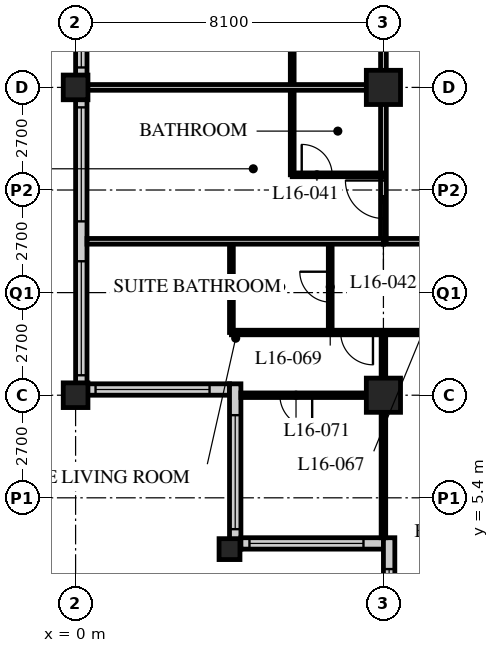
"""IFC4 building model, lengths in metres.
Left out: names, types, materials, properties, quantities, classifications, styles, units other than length and angle.
Written with IfcOpenShell. Run it as: python <this file> out.ifc"""

import sys

from ifc_helpers import new_model, si_unit, direction, frame, frame_2d, origin, origin_2d, place, context, subcontext, project, spatial, rectangle, hollow_rectangle, extrude, element, fill, save


model = new_model("IFC4")
c1 = context("Model", 3, precision=1e-05, world=origin(), true_north=direction((0.0, 1.0)))
c2 = subcontext(c1, "Body", "Model", "MODEL_VIEW")
j1 = project(units=[si_unit("LENGTHUNIT", "METRE"), si_unit("PLANEANGLEUNIT", "RADIAN")], contexts=[c1])
p1 = place(None, origin())
s1 = spatial("IfcSite", under=j1, at=p1, CompositionType="ELEMENT")
p2 = place(p1, origin())
s2 = spatial("IfcBuilding", under=s1, at=p2, CompositionType="ELEMENT")
p3 = place(p2, frame((0.0, 0.0, 67.0)))
s3 = spatial("IfcBuildingStorey", under=s2, at=p3, CompositionType="ELEMENT", Elevation=67.0)
for number, where, z_axis, x_axis in (
    (1, (0.0, 8.1, 0.0), (0.0, 0.0, 1.0), (1.0, 0.0, 0.0)),
    (2, (0.0, 16.2, 0.0), (0.0, 0.0, 1.0), (1.0, 0.0, 0.0)),
):
    element("IfcColumn", number, at=place(p3, frame(where, z_axis=z_axis, x_axis=x_axis)), inside=s3, PredefinedType="COLUMN", context=c2, shape_type="SweptSolid", body=[
        extrude(hollow_rectangle(XDim=0.65, YDim=0.65, WallThickness=0.05, at=origin_2d()), origin(), (0.0, 0.0, 1.0), 3.4),
    ])
p4 = place(p3, frame((4.05, 4.05, 0.0), z_axis=(0.0, 0.0, 1.0), x_axis=(1.0, 0.0, 0.0)))
e3 = element("IfcColumn", 3, at=p4, inside=s3, PredefinedType="COLUMN", context=c2, shape_type="SweptSolid", body=[
    extrude(hollow_rectangle(XDim=0.55, YDim=0.55, WallThickness=0.05, at=origin_2d()), origin(), (0.0, 0.0, 1.0), 3.4),
])
for number, where, z_axis, x_axis in (
    (4, (8.1, 8.1, 0.0), (0.0, 0.0, 1.0), (1.0, 0.0, 0.0)),
    (5, (8.1, 16.2, 0.0), (0.0, 0.0, 1.0), (1.0, 0.0, 0.0)),
):
    element("IfcColumn", number, at=place(p3, frame(where, z_axis=z_axis, x_axis=x_axis)), inside=s3, PredefinedType="COLUMN", context=c2, shape_type="SweptSolid", body=[
        extrude(hollow_rectangle(XDim=0.9, YDim=0.9, WallThickness=0.09, at=origin_2d()), origin(), (0.0, 0.0, 1.0), 3.4),
    ])
p5 = place(p3, frame((0.15, 40.2, 0.0), z_axis=(0.0, 0.0, 1.0), x_axis=(0.0, -1.0, 0.0)))
e6 = element("IfcWall", 6, at=p5, inside=s3, PredefinedType="SOLIDWALL", context=c2, shape_type="SweptSolid", body=[
    extrude(rectangle(XDim=32.1, YDim=0.3, at=frame_2d((16.05, 0.0))), origin(), (0.0, 0.0, 1.0), 3.19),
])
p6 = place(p5, frame((0.225, 0.0, 0.9)))
e7 = element("IfcOpeningElement", 7, at=p6, cuts=e6, PredefinedType="OPENING", context=c2, shape_type="SweptSolid", body=[
    extrude(rectangle(XDim=3.0, YDim=2.0, at=frame_2d((1.5, 1.0))), frame((0.0, 0.16, 0.0), z_axis=(0.0, -1.0, 0.0), x_axis=(1.0, 0.0, 0.0)), (0.0, 0.0, 1.0), 0.32),
])
p7 = place(p5, frame((4.275, 0.0, 0.9)))
e8 = element("IfcOpeningElement", 8, at=p7, cuts=e6, PredefinedType="OPENING", context=c2, shape_type="SweptSolid", body=[
    extrude(rectangle(XDim=3.0, YDim=2.0, at=frame_2d((1.5, 1.0))), frame((0.0, 0.16, 0.0), z_axis=(0.0, -1.0, 0.0), x_axis=(1.0, 0.0, 0.0)), (0.0, 0.0, 1.0), 0.32),
])
p8 = place(p5, frame((8.325, 0.0, 0.9)))
e9 = element("IfcOpeningElement", 9, at=p8, cuts=e6, PredefinedType="OPENING", context=c2, shape_type="SweptSolid", body=[
    extrude(rectangle(XDim=3.0, YDim=2.0, at=frame_2d((1.5, 1.0))), frame((0.0, 0.16, 0.0), z_axis=(0.0, -1.0, 0.0), x_axis=(1.0, 0.0, 0.0)), (0.0, 0.0, 1.0), 0.32),
])
p9 = place(p5, frame((12.375, 0.0, 0.9)))
e10 = element("IfcOpeningElement", 10, at=p9, cuts=e6, PredefinedType="OPENING", context=c2, shape_type="SweptSolid", body=[
    extrude(rectangle(XDim=3.0, YDim=2.0, at=frame_2d((1.5, 1.0))), frame((0.0, 0.16, 0.0), z_axis=(0.0, -1.0, 0.0), x_axis=(1.0, 0.0, 0.0)), (0.0, 0.0, 1.0), 0.32),
])
p10 = place(p5, frame((16.425, 0.0, 0.9)))
e11 = element("IfcOpeningElement", 11, at=p10, cuts=e6, PredefinedType="OPENING", context=c2, shape_type="SweptSolid", body=[
    extrude(rectangle(XDim=3.0, YDim=2.0, at=frame_2d((1.5, 1.0))), frame((0.0, 0.16, 0.0), z_axis=(0.0, -1.0, 0.0), x_axis=(1.0, 0.0, 0.0)), (0.0, 0.0, 1.0), 0.32),
])
p11 = place(p5, frame((20.475, 0.0, 0.9)))
e12 = element("IfcOpeningElement", 12, at=p11, cuts=e6, PredefinedType="OPENING", context=c2, shape_type="SweptSolid", body=[
    extrude(rectangle(XDim=3.0, YDim=2.0, at=frame_2d((1.5, 1.0))), frame((0.0, 0.16, 0.0), z_axis=(0.0, -1.0, 0.0), x_axis=(1.0, 0.0, 0.0)), (0.0, 0.0, 1.0), 0.32),
])
p12 = place(p5, frame((24.525, 0.0, 0.9)))
e13 = element("IfcOpeningElement", 13, at=p12, cuts=e6, PredefinedType="OPENING", context=c2, shape_type="SweptSolid", body=[
    extrude(rectangle(XDim=3.0, YDim=2.0, at=frame_2d((1.5, 1.0))), frame((0.0, 0.16, 0.0), z_axis=(0.0, -1.0, 0.0), x_axis=(1.0, 0.0, 0.0)), (0.0, 0.0, 1.0), 0.32),
])
p13 = place(p5, frame((28.575, 0.0, 0.9)))
e14 = element("IfcOpeningElement", 14, at=p13, cuts=e6, PredefinedType="OPENING", context=c2, shape_type="SweptSolid", body=[
    extrude(rectangle(XDim=3.0, YDim=2.0, at=frame_2d((1.5, 1.0))), frame((0.0, 0.16, 0.0), z_axis=(0.0, -1.0, 0.0), x_axis=(1.0, 0.0, 0.0)), (0.0, 0.0, 1.0), 0.32),
])
p14 = place(p3, frame((0.3, 8.25, 0.0), z_axis=(0.0, 0.0, 1.0), x_axis=(1.0, 0.0, 0.0)))
e15 = element("IfcWall", 15, at=p14, inside=s3, PredefinedType="SOLIDWALL", context=c2, shape_type="SweptSolid", body=[
    extrude(rectangle(XDim=3.75, YDim=0.3, at=frame_2d((1.875, 0.0))), origin(), (0.0, 0.0, 1.0), 3.19),
])
p15 = place(p14, frame((0.225, 0.0, 0.9)))
e16 = element("IfcOpeningElement", 16, at=p15, cuts=e15, PredefinedType="OPENING", context=c2, shape_type="SweptSolid", body=[
    extrude(rectangle(XDim=3.0, YDim=1.5, at=frame_2d((1.5, 0.75))), frame((0.0, 0.16, 0.0), z_axis=(0.0, -1.0, 0.0), x_axis=(1.0, 0.0, 0.0)), (0.0, 0.0, 1.0), 0.32),
])
p16 = place(p3, frame((4.2, 8.4, 0.0), z_axis=(0.0, 0.0, 1.0), x_axis=(0.0, -1.0, 0.0)))
e17 = element("IfcWall", 17, at=p16, inside=s3, PredefinedType="SOLIDWALL", context=c2, shape_type="SweptSolid", body=[
    extrude(rectangle(XDim=4.35, YDim=0.3, at=frame_2d((2.175, 0.0))), origin(), (0.0, 0.0, 1.0), 3.19),
])
p17 = place(p16, frame((0.825, 0.0, 0.9)))
e18 = element("IfcOpeningElement", 18, at=p17, cuts=e17, PredefinedType="OPENING", context=c2, shape_type="SweptSolid", body=[
    extrude(rectangle(XDim=3.0, YDim=1.5, at=frame_2d((1.5, 0.75))), frame((0.0, 0.16, 0.0), z_axis=(0.0, -1.0, 0.0), x_axis=(1.0, 0.0, 0.0)), (0.0, 0.0, 1.0), 0.32),
])
p18 = place(p3, frame((4.35, 4.2, 0.0), z_axis=(0.0, 0.0, 1.0), x_axis=(1.0, 0.0, 0.0)))
e19 = element("IfcWall", 19, at=p18, inside=s3, PredefinedType="SOLIDWALL", context=c2, shape_type="SweptSolid", body=[
    extrude(rectangle(XDim=3.75, YDim=0.3, at=frame_2d((1.875, 0.0))), origin(), (0.0, 0.0, 1.0), 3.19),
])
p19 = place(p18, frame((0.225, 0.0, 0.9)))
e20 = element("IfcOpeningElement", 20, at=p19, cuts=e19, PredefinedType="OPENING", context=c2, shape_type="SweptSolid", body=[
    extrude(rectangle(XDim=3.0, YDim=1.5, at=frame_2d((1.5, 0.75))), frame((0.0, 0.16, 0.0), z_axis=(0.0, -1.0, 0.0), x_axis=(1.0, 0.0, 0.0)), (0.0, 0.0, 1.0), 0.32),
])
p20 = place(p3, frame((8.25, 4.35, 0.0), z_axis=(0.0, 0.0, 1.0), x_axis=(0.0, -1.0, 0.0)))
e21 = element("IfcWall", 21, at=p20, inside=s3, PredefinedType="SOLIDWALL", context=c2, shape_type="SweptSolid", body=[
    extrude(rectangle(XDim=4.35, YDim=0.3, at=frame_2d((2.175, 0.0))), origin(), (0.0, 0.0, 1.0), 3.19),
])
p21 = place(p20, frame((0.825, 0.0, 0.9)))
e22 = element("IfcOpeningElement", 22, at=p21, cuts=e21, PredefinedType="OPENING", context=c2, shape_type="SweptSolid", body=[
    extrude(rectangle(XDim=3.0, YDim=1.5, at=frame_2d((1.5, 0.75))), frame((0.0, 0.16, 0.0), z_axis=(0.0, -1.0, 0.0), x_axis=(1.0, 0.0, 0.0)), (0.0, 0.0, 1.0), 0.32),
])
p22 = place(p3, frame((8.1, 12.15, 0.0), z_axis=(0.0, 0.0, 1.0), x_axis=(1.0, 0.0, 0.0)))
e23 = element("IfcWall", 23, at=p22, inside=s3, PredefinedType="PARTITIONING", context=c2, shape_type="SweptSolid", body=[
    extrude(rectangle(XDim=36.45, YDim=0.15, at=frame_2d((18.225, 0.0))), origin(), (0.0, 0.0, 1.0), 3.19),
])
p23 = place(p22, frame((4.35, 0.0, 0.0)))
e24 = element("IfcOpeningElement", 24, at=p23, cuts=e23, PredefinedType="OPENING", context=c2, shape_type="SweptSolid", body=[
    extrude(rectangle(XDim=1.0, YDim=2.1, at=frame_2d((0.5, 1.05))), frame((0.0, 0.085, 0.0), z_axis=(0.0, -1.0, 0.0), x_axis=(1.0, 0.0, 0.0)), (0.0, 0.0, 1.0), 0.17),
])
p24 = place(p22, frame((10.55, 0.0, 0.0)))
e25 = element("IfcOpeningElement", 25, at=p24, cuts=e23, PredefinedType="OPENING", context=c2, shape_type="SweptSolid", body=[
    extrude(rectangle(XDim=1.0, YDim=2.1, at=frame_2d((0.5, 1.05))), frame((0.0, 0.085, 0.0), z_axis=(0.0, -1.0, 0.0), x_axis=(1.0, 0.0, 0.0)), (0.0, 0.0, 1.0), 0.17),
])
p25 = place(p22, frame((14.6, 0.0, 0.0)))
e26 = element("IfcOpeningElement", 26, at=p25, cuts=e23, PredefinedType="OPENING", context=c2, shape_type="SweptSolid", body=[
    extrude(rectangle(XDim=1.0, YDim=2.1, at=frame_2d((0.5, 1.05))), frame((0.0, 0.085, 0.0), z_axis=(0.0, -1.0, 0.0), x_axis=(1.0, 0.0, 0.0)), (0.0, 0.0, 1.0), 0.17),
])
p26 = place(p22, frame((18.65, 0.0, 0.0)))
e27 = element("IfcOpeningElement", 27, at=p26, cuts=e23, PredefinedType="OPENING", context=c2, shape_type="SweptSolid", body=[
    extrude(rectangle(XDim=1.0, YDim=2.1, at=frame_2d((0.5, 1.05))), frame((0.0, 0.085, 0.0), z_axis=(0.0, -1.0, 0.0), x_axis=(1.0, 0.0, 0.0)), (0.0, 0.0, 1.0), 0.17),
])
p27 = place(p22, frame((22.7, 0.0, 0.0)))
e28 = element("IfcOpeningElement", 28, at=p27, cuts=e23, PredefinedType="OPENING", context=c2, shape_type="SweptSolid", body=[
    extrude(rectangle(XDim=1.0, YDim=2.1, at=frame_2d((0.5, 1.05))), frame((0.0, 0.085, 0.0), z_axis=(0.0, -1.0, 0.0), x_axis=(1.0, 0.0, 0.0)), (0.0, 0.0, 1.0), 0.17),
])
p28 = place(p22, frame((24.6, 0.0, 0.0)))
e29 = element("IfcOpeningElement", 29, at=p28, cuts=e23, PredefinedType="OPENING", context=c2, shape_type="SweptSolid", body=[
    extrude(rectangle(XDim=1.0, YDim=2.1, at=frame_2d((0.5, 1.05))), frame((0.0, 0.085, 0.0), z_axis=(0.0, -1.0, 0.0), x_axis=(1.0, 0.0, 0.0)), (0.0, 0.0, 1.0), 0.17),
])
p29 = place(p22, frame((30.8, 0.0, 0.0)))
e30 = element("IfcOpeningElement", 30, at=p29, cuts=e23, PredefinedType="OPENING", context=c2, shape_type="SweptSolid", body=[
    extrude(rectangle(XDim=1.0, YDim=2.1, at=frame_2d((0.5, 1.05))), frame((0.0, 0.085, 0.0), z_axis=(0.0, -1.0, 0.0), x_axis=(1.0, 0.0, 0.0)), (0.0, 0.0, 1.0), 0.17),
])
p30 = place(p22, frame((1.525, 0.0, 0.0)))
e31 = element("IfcOpeningElement", 31, at=p30, cuts=e23, PredefinedType="OPENING", context=c2, shape_type="SweptSolid", body=[
    extrude(rectangle(XDim=1.0, YDim=2.1, at=frame_2d((0.5, 1.05))), frame((0.0, 0.085, 0.0), z_axis=(0.0, -1.0, 0.0), x_axis=(1.0, 0.0, 0.0)), (0.0, 0.0, 1.0), 0.17),
])
p31 = place(p22, frame((33.925, 0.0, 0.0)))
e32 = element("IfcOpeningElement", 32, at=p31, cuts=e23, PredefinedType="OPENING", context=c2, shape_type="SweptSolid", body=[
    extrude(rectangle(XDim=1.0, YDim=2.1, at=frame_2d((0.5, 1.05))), frame((0.0, 0.085, 0.0), z_axis=(0.0, -1.0, 0.0), x_axis=(1.0, 0.0, 0.0)), (0.0, 0.0, 1.0), 0.17),
])
p32 = place(p3, frame((8.1, 12.15, 0.0), z_axis=(0.0, 0.0, 1.0), x_axis=(0.0, 1.0, 0.0)))
e33 = element("IfcWall", 33, at=p32, inside=s3, PredefinedType="PARTITIONING", context=c2, shape_type="SweptSolid", body=[
    extrude(rectangle(XDim=30.15, YDim=0.15, at=frame_2d((15.075, 0.0))), origin(), (0.0, 0.0, 1.0), 2.578),
])
p33 = place(p32, frame((0.6, 0.0, 0.0)))
e34 = element("IfcOpeningElement", 34, at=p33, cuts=e33, PredefinedType="OPENING", context=c2, shape_type="SweptSolid", body=[
    extrude(rectangle(XDim=1.0, YDim=2.1, at=frame_2d((0.5, 1.05))), frame((0.0, 0.085, 0.0), z_axis=(0.0, -1.0, 0.0), x_axis=(1.0, 0.0, 0.0)), (0.0, 0.0, 1.0), 0.17),
])
p34 = place(p32, frame((6.8, 0.0, 0.0)))
e35 = element("IfcOpeningElement", 35, at=p34, cuts=e33, PredefinedType="OPENING", context=c2, shape_type="SweptSolid", body=[
    extrude(rectangle(XDim=1.0, YDim=2.1, at=frame_2d((0.5, 1.05))), frame((0.0, 0.085, 0.0), z_axis=(0.0, -1.0, 0.0), x_axis=(1.0, 0.0, 0.0)), (0.0, 0.0, 1.0), 0.17),
])
p35 = place(p32, frame((8.7, 0.0, 0.0)))
e36 = element("IfcOpeningElement", 36, at=p35, cuts=e33, PredefinedType="OPENING", context=c2, shape_type="SweptSolid", body=[
    extrude(rectangle(XDim=1.0, YDim=2.1, at=frame_2d((0.5, 1.05))), frame((0.0, 0.085, 0.0), z_axis=(0.0, -1.0, 0.0), x_axis=(1.0, 0.0, 0.0)), (0.0, 0.0, 1.0), 0.17),
])
p36 = place(p32, frame((14.6, 0.0, 0.0)))
e37 = element("IfcOpeningElement", 37, at=p36, cuts=e33, PredefinedType="OPENING", context=c2, shape_type="SweptSolid", body=[
    extrude(rectangle(XDim=1.0, YDim=2.1, at=frame_2d((0.5, 1.05))), frame((0.0, 0.085, 0.0), z_axis=(0.0, -1.0, 0.0), x_axis=(1.0, 0.0, 0.0)), (0.0, 0.0, 1.0), 0.17),
])
p37 = place(p32, frame((21.65, 0.0, 0.0)))
e38 = element("IfcOpeningElement", 38, at=p37, cuts=e33, PredefinedType="OPENING", context=c2, shape_type="SweptSolid", body=[
    extrude(rectangle(XDim=1.0, YDim=2.1, at=frame_2d((0.5, 1.05))), frame((0.0, 0.085, 0.0), z_axis=(0.0, -1.0, 0.0), x_axis=(1.0, 0.0, 0.0)), (0.0, 0.0, 1.0), 0.17),
])
p38 = place(p32, frame((26.75, 0.0, 0.0)))
e39 = element("IfcOpeningElement", 39, at=p38, cuts=e33, PredefinedType="OPENING", context=c2, shape_type="SweptSolid", body=[
    extrude(rectangle(XDim=1.0, YDim=2.1, at=frame_2d((0.5, 1.05))), frame((0.0, 0.085, 0.0), z_axis=(0.0, -1.0, 0.0), x_axis=(1.0, 0.0, 0.0)), (0.0, 0.0, 1.0), 0.17),
])
p39 = place(p3, frame((5.7, 13.9, 0.0), z_axis=(0.0, 0.0, 1.0), x_axis=(0.0, 1.0, 0.0)))
e40 = element("IfcWall", 40, at=p39, inside=s3, PredefinedType="PARTITIONING", context=c2, shape_type="SweptSolid", body=[
    extrude(rectangle(XDim=4.9, YDim=0.1, at=frame_2d((2.45, 0.0))), origin(), (0.0, 0.0, 1.0), 3.19),
])
p40 = place(p3, frame((8.1, 13.9, 0.0), z_axis=(0.0, 0.0, 1.0), x_axis=(-1.0, 0.0, 0.0)))
e41 = element("IfcWall", 41, at=p40, inside=s3, PredefinedType="PARTITIONING", context=c2, shape_type="SweptSolid", body=[
    extrude(rectangle(XDim=2.4, YDim=0.1, at=frame_2d((1.2, 0.0))), origin(), (0.0, 0.0, 1.0), 3.19),
])
p41 = place(p40, frame((1.35, 0.0, 0.0)))
e42 = element("IfcOpeningElement", 42, at=p41, cuts=e41, PredefinedType="OPENING", context=c2, shape_type="SweptSolid", body=[
    extrude(rectangle(XDim=0.8, YDim=2.1, at=frame_2d((0.4, 1.05))), frame((0.0, 0.06, 0.0), z_axis=(0.0, -1.0, 0.0), x_axis=(1.0, 0.0, 0.0)), (0.0, 0.0, 1.0), 0.12),
])
p42 = place(p3, frame((8.1, 16.2, 0.0), z_axis=(0.0, 0.0, 1.0), x_axis=(-1.0, 0.0, 0.0)))
e43 = element("IfcWall", 43, at=p42, inside=s3, PredefinedType="PARTITIONING", context=c2, shape_type="SweptSolid", body=[
    extrude(rectangle(XDim=7.8, YDim=0.15, at=frame_2d((3.9, 0.0))), origin(), (0.0, 0.0, 1.0), 2.578),
])
p43 = place(p3, frame((6.7, 12.15, 0.0), z_axis=(0.0, 0.0, 1.0), x_axis=(0.0, -1.0, 0.0)))
e44 = element("IfcWall", 44, at=p43, inside=s3, PredefinedType="PARTITIONING", context=c2, shape_type="SweptSolid", body=[
    extrude(rectangle(XDim=2.4, YDim=0.1, at=frame_2d((1.2, 0.0))), origin(), (0.0, 0.0, 1.0), 3.19),
])
p44 = place(p43, frame((0.8, 0.0, 0.0)))
e45 = element("IfcOpeningElement", 45, at=p44, cuts=e44, PredefinedType="OPENING", context=c2, shape_type="SweptSolid", body=[
    extrude(rectangle(XDim=0.8, YDim=2.1, at=frame_2d((0.4, 1.05))), frame((0.0, 0.06, 0.0), z_axis=(0.0, -1.0, 0.0), x_axis=(1.0, 0.0, 0.0)), (0.0, 0.0, 1.0), 0.12),
])
p45 = place(p3, frame((4.1, 12.15, 0.0), z_axis=(0.0, 0.0, 1.0), x_axis=(0.0, -1.0, 0.0)))
e46 = element("IfcWall", 46, at=p45, inside=s3, PredefinedType="PARTITIONING", context=c2, shape_type="SweptSolid", body=[
    extrude(rectangle(XDim=2.4, YDim=0.1, at=frame_2d((1.2, 0.0))), origin(), (0.0, 0.0, 1.0), 3.19),
])
p46 = place(p3, frame((4.1, 9.75, 0.0), z_axis=(0.0, 0.0, 1.0), x_axis=(1.0, 0.0, 0.0)))
e47 = element("IfcWall", 47, at=p46, inside=s3, PredefinedType="PARTITIONING", context=c2, shape_type="SweptSolid", body=[
    extrude(rectangle(XDim=8.05, YDim=0.12, at=frame_2d((4.025, 0.0))), origin(), (0.0, 0.0, 1.0), 3.19),
])
p47 = place(p46, frame((6.725, 0.0, 0.0)))
e48 = element("IfcOpeningElement", 48, at=p47, cuts=e47, PredefinedType="OPENING", context=c2, shape_type="SweptSolid", body=[
    extrude(rectangle(XDim=0.85, YDim=2.1, at=frame_2d((0.425, 1.05))), frame((0.0, 0.07, 0.0), z_axis=(0.0, -1.0, 0.0), x_axis=(1.0, 0.0, 0.0)), (0.0, 0.0, 1.0), 0.14),
])
p48 = place(p46, frame((2.875, 0.0, 0.0)))
e49 = element("IfcOpeningElement", 49, at=p48, cuts=e47, PredefinedType="OPENING", context=c2, shape_type="SweptSolid", body=[
    extrude(rectangle(XDim=0.85, YDim=2.1, at=frame_2d((0.425, 1.05))), frame((0.0, 0.07, 0.0), z_axis=(0.0, -1.0, 0.0), x_axis=(1.0, 0.0, 0.0)), (0.0, 0.0, 1.0), 0.14),
])
p49 = place(p3, frame((8.1, 9.75, 0.0), z_axis=(0.0, 0.0, 1.0), x_axis=(0.0, -1.0, 0.0)))
e50 = element("IfcWall", 50, at=p49, inside=s3, PredefinedType="PARTITIONING", context=c2, shape_type="SweptSolid", body=[
    extrude(rectangle(XDim=5.4, YDim=0.12, at=frame_2d((2.7, 0.0))), origin(), (0.0, 0.0, 1.0), 2.578),
])
p50 = place(p3, frame((8.1, 8.1, 0.0), z_axis=(0.0, 0.0, 1.0), x_axis=(-1.0, 0.0, 0.0)))
e51 = element("IfcWall", 51, at=p50, inside=s3, PredefinedType="PARTITIONING", context=c2, shape_type="SweptSolid", body=[
    extrude(rectangle(XDim=3.75, YDim=0.12, at=frame_2d((1.875, 0.0))), origin(), (0.0, 0.0, 1.0), 2.578),
])
p51 = place(p50, frame((1.875, 0.0, 0.0)))
e52 = element("IfcOpeningElement", 52, at=p51, cuts=e51, PredefinedType="OPENING", context=c2, shape_type="SweptSolid", body=[
    extrude(rectangle(XDim=0.85, YDim=2.1, at=frame_2d((0.425, 1.05))), frame((0.0, 0.07, 0.0), z_axis=(0.0, -1.0, 0.0), x_axis=(1.0, 0.0, 0.0)), (0.0, 0.0, 1.0), 0.14),
])
p52 = place(p3, frame((0.3, 12.15, 0.0), z_axis=(0.0, 0.0, 1.0), x_axis=(1.0, 0.0, 0.0)))
e53 = element("IfcWall", 53, at=p52, inside=s3, PredefinedType="PARTITIONING", context=c2, shape_type="SweptSolid", body=[
    extrude(rectangle(XDim=7.8, YDim=0.15, at=frame_2d((3.9, 0.0))), origin(), (0.0, 0.0, 1.0), 3.19),
])
p53 = place(p11, origin())
e54 = element("IfcWindow", 54, at=p53, inside=s3, PartitioningType="SINGLE_PANEL", PredefinedType="WINDOW", context=c2, shape_type="SweptSolid", body=[
    extrude(rectangle(XDim=3.0, YDim=2.0, at=frame_2d((1.5, 1.0))), frame((0.0, 0.03, 0.0), z_axis=(0.0, -1.0, 0.0), x_axis=(1.0, 0.0, 0.0)), (0.0, 0.0, 1.0), 0.06),
])
fill(e12, e54)
p54 = place(p12, origin())
e55 = element("IfcWindow", 55, at=p54, inside=s3, PartitioningType="SINGLE_PANEL", PredefinedType="WINDOW", context=c2, shape_type="SweptSolid", body=[
    extrude(rectangle(XDim=3.0, YDim=2.0, at=frame_2d((1.5, 1.0))), frame((0.0, 0.03, 0.0), z_axis=(0.0, -1.0, 0.0), x_axis=(1.0, 0.0, 0.0)), (0.0, 0.0, 1.0), 0.06),
])
fill(e13, e55)
p55 = place(p13, origin())
e56 = element("IfcWindow", 56, at=p55, inside=s3, PartitioningType="SINGLE_PANEL", PredefinedType="WINDOW", context=c2, shape_type="SweptSolid", body=[
    extrude(rectangle(XDim=3.0, YDim=2.0, at=frame_2d((1.5, 1.0))), frame((0.0, 0.03, 0.0), z_axis=(0.0, -1.0, 0.0), x_axis=(1.0, 0.0, 0.0)), (0.0, 0.0, 1.0), 0.06),
])
fill(e14, e56)
p56 = place(p15, origin())
e57 = element("IfcWindow", 57, at=p56, inside=s3, PartitioningType="SINGLE_PANEL", PredefinedType="WINDOW", context=c2, shape_type="SweptSolid", body=[
    extrude(rectangle(XDim=3.0, YDim=1.5, at=frame_2d((1.5, 0.75))), frame((0.0, 0.03, 0.0), z_axis=(0.0, -1.0, 0.0), x_axis=(1.0, 0.0, 0.0)), (0.0, 0.0, 1.0), 0.06),
])
fill(e16, e57)
p57 = place(p17, origin())
e58 = element("IfcWindow", 58, at=p57, inside=s3, PartitioningType="SINGLE_PANEL", PredefinedType="WINDOW", context=c2, shape_type="SweptSolid", body=[
    extrude(rectangle(XDim=3.0, YDim=1.5, at=frame_2d((1.5, 0.75))), frame((0.0, 0.03, 0.0), z_axis=(0.0, -1.0, 0.0), x_axis=(1.0, 0.0, 0.0)), (0.0, 0.0, 1.0), 0.06),
])
fill(e18, e58)
p58 = place(p19, origin())
e59 = element("IfcWindow", 59, at=p58, inside=s3, PartitioningType="SINGLE_PANEL", PredefinedType="WINDOW", context=c2, shape_type="SweptSolid", body=[
    extrude(rectangle(XDim=3.0, YDim=1.5, at=frame_2d((1.5, 0.75))), frame((0.0, 0.03, 0.0), z_axis=(0.0, -1.0, 0.0), x_axis=(1.0, 0.0, 0.0)), (0.0, 0.0, 1.0), 0.06),
])
fill(e20, e59)
p59 = place(p21, origin())
e60 = element("IfcWindow", 60, at=p59, inside=s3, PartitioningType="SINGLE_PANEL", PredefinedType="WINDOW", context=c2, shape_type="SweptSolid", body=[
    extrude(rectangle(XDim=3.0, YDim=1.5, at=frame_2d((1.5, 0.75))), frame((0.0, 0.03, 0.0), z_axis=(0.0, -1.0, 0.0), x_axis=(1.0, 0.0, 0.0)), (0.0, 0.0, 1.0), 0.06),
])
fill(e22, e60)
p60 = place(p41, origin())
e61 = element("IfcDoor", 61, at=p60, inside=s3, OperationType="SINGLE_SWING_LEFT", PredefinedType="DOOR", context=c2, shape_type="SweptSolid", body=[
    extrude(rectangle(XDim=0.8, YDim=2.1, at=frame_2d((0.4, 1.05))), frame((0.0, 0.025, 0.0), z_axis=(0.0, -1.0, 0.0), x_axis=(1.0, 0.0, 0.0)), (0.0, 0.0, 1.0), 0.05),
])
fill(e42, e61)
p61 = place(p33, origin())
e62 = element("IfcDoor", 62, at=p61, inside=s3, OperationType="SINGLE_SWING_RIGHT", PredefinedType="DOOR", context=c2, shape_type="SweptSolid", body=[
    extrude(rectangle(XDim=1.0, YDim=2.1, at=frame_2d((0.5, 1.05))), frame((0.0, 0.025, 0.0), z_axis=(0.0, -1.0, 0.0), x_axis=(1.0, 0.0, 0.0)), (0.0, 0.0, 1.0), 0.05),
])
fill(e34, e62)
p62 = place(p44, origin())
e63 = element("IfcDoor", 63, at=p62, inside=s3, OperationType="SINGLE_SWING_RIGHT", PredefinedType="DOOR", context=c2, shape_type="SweptSolid", body=[
    extrude(rectangle(XDim=0.8, YDim=2.1, at=frame_2d((0.4, 1.05))), frame((0.0, 0.025, 0.0), z_axis=(0.0, -1.0, 0.0), x_axis=(1.0, 0.0, 0.0)), (0.0, 0.0, 1.0), 0.05),
])
fill(e45, e63)
p63 = place(p48, origin())
e64 = element("IfcDoor", 64, at=p63, inside=s3, OperationType="SINGLE_SWING_LEFT", PredefinedType="DOOR", context=c2, shape_type="SweptSolid", body=[
    extrude(rectangle(XDim=0.85, YDim=2.1, at=frame_2d((0.425, 1.05))), frame((0.0, 0.025, 0.0), z_axis=(0.0, -1.0, 0.0), x_axis=(1.0, 0.0, 0.0)), (0.0, 0.0, 1.0), 0.05),
])
fill(e49, e64)
p64 = place(p51, origin())
e65 = element("IfcDoor", 65, at=p64, inside=s3, OperationType="SINGLE_SWING_LEFT", PredefinedType="DOOR", context=c2, shape_type="SweptSolid", body=[
    extrude(rectangle(XDim=0.85, YDim=2.1, at=frame_2d((0.425, 1.05))), frame((0.0, 0.025, 0.0), z_axis=(0.0, -1.0, 0.0), x_axis=(1.0, 0.0, 0.0)), (0.0, 0.0, 1.0), 0.05),
])
fill(e52, e65)
save(model, sys.argv[1])
